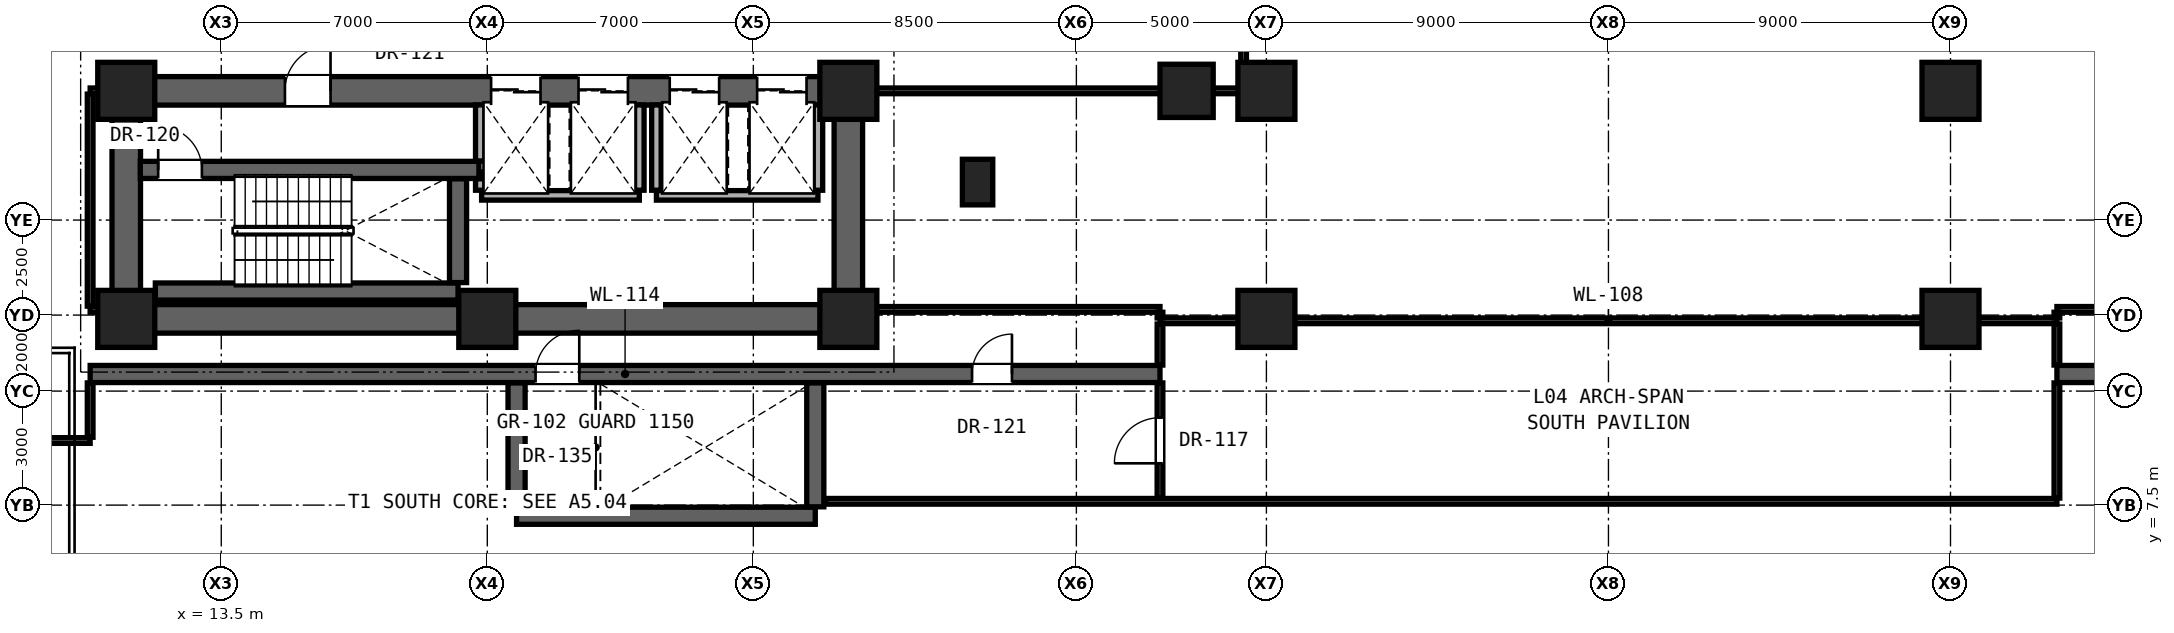
"""IFC4 building model, lengths in metres.
Left out: names, types, materials, properties, quantities, classifications, styles, units other than length and angle.
Written with IfcOpenShell. Run it as: python <this file> out.ifc"""

import sys

from ifc_helpers import new_model, si_unit, direction, frame, frame_2d, origin, origin_2d, place, context, subcontext, project, spatial, rectangle, hollow_rectangle, extrude, element, fill, save


model = new_model("IFC4")
c1 = context("Model", 3, precision=1e-05, world=origin(), true_north=direction((0.0, 1.0)))
c2 = subcontext(c1, "Body", "Model", "MODEL_VIEW")
j1 = project(units=[si_unit("LENGTHUNIT", "METRE"), si_unit("PLANEANGLEUNIT", "RADIAN")], contexts=[c1])
p1 = place(None, origin())
s1 = spatial("IfcSite", under=j1, at=p1, CompositionType="ELEMENT")
p2 = place(p1, origin())
s2 = spatial("IfcBuilding", under=s1, at=p2, CompositionType="ELEMENT")
p3 = place(p2, frame((0.0, 0.0, 18.1)))
s3 = spatial("IfcBuildingStorey", under=s2, at=p3, CompositionType="ELEMENT", Elevation=18.1)
for number, where, z_axis, x_axis in (
    (1, (11.0, 12.4, 0.0), (0.0, 0.0, 1.0), (1.0, 0.0, 0.0)),
    (2, (20.5, 12.4, 0.0), (0.0, 0.0, 1.0), (1.0, 0.0, 0.0)),
    (3, (30.0, 12.4, 0.0), (0.0, 0.0, 1.0), (1.0, 0.0, 0.0)),
    (4, (11.0, 18.4, 0.0), (0.0, 0.0, 1.0), (1.0, 0.0, 0.0)),
    (5, (30.0, 18.4, 0.0), (0.0, 0.0, 1.0), (1.0, 0.0, 0.0)),
):
    element("IfcColumn", number, at=place(p3, frame(where, z_axis=z_axis, x_axis=x_axis)), inside=s3, PredefinedType="COLUMN", context=c2, shape_type="SweptSolid", body=[
        extrude(rectangle(XDim=1.5, YDim=1.5, at=origin_2d()), origin(), (0.0, 0.0, 1.0), 4.3),
    ])
p4 = place(p3, frame((38.9, 18.4, 0.0), z_axis=(0.0, 0.0, 1.0), x_axis=(1.0, 0.0, 0.0)))
e6 = element("IfcColumn", 6, at=p4, inside=s3, PredefinedType="COLUMN", context=c2, shape_type="SweptSolid", body=[
    extrude(hollow_rectangle(XDim=1.4, YDim=1.4, WallThickness=0.08, at=origin_2d()), origin(), (0.0, 0.0, 1.0), 4.3),
])
p5 = place(p3, frame((33.4, 16.0, 0.0), z_axis=(0.0, 0.0, 1.0), x_axis=(1.0, 0.0, 0.0)))
e7 = element("IfcColumn", 7, at=p5, inside=s3, PredefinedType="PILASTER", context=c2, shape_type="SweptSolid", body=[
    extrude(rectangle(XDim=0.8, YDim=1.2, at=origin_2d()), origin(), (0.0, 0.0, 1.0), 4.3),
])
p6 = place(p3, frame((11.0, 12.4, 0.0), z_axis=(0.0, 0.0, 1.0), x_axis=(1.0, 0.0, 0.0)))
e8 = element("IfcWall", 8, at=p6, inside=s3, PredefinedType="SHEAR", context=c2, shape_type="SweptSolid", body=[
    extrude(rectangle(XDim=19.0, YDim=0.75, at=frame_2d((9.5, 0.0))), origin(), (0.0, 0.0, 1.0), 3.65),
])
for number, where, z_axis, x_axis in (
    (9, (11.0, 12.4, 0.0), (0.0, 0.0, 1.0), (0.0, 1.0, 0.0)),
    (10, (30.0, 12.4, 0.0), (0.0, 0.0, 1.0), (0.0, 1.0, 0.0)),
):
    element("IfcWall", number, at=place(p3, frame(where, z_axis=z_axis, x_axis=x_axis)), inside=s3, PredefinedType="SHEAR", context=c2, shape_type="SweptSolid", body=[
        extrude(rectangle(XDim=6.0, YDim=0.75, at=frame_2d((3.0, 0.0))), origin(), (0.0, 0.0, 1.0), 3.65),
    ])
p7 = place(p3, frame((11.0, 18.4, 0.0), z_axis=(0.0, 0.0, 1.0), x_axis=(1.0, 0.0, 0.0)))
e11 = element("IfcWall", 11, at=p7, inside=s3, PredefinedType="SHEAR", context=c2, shape_type="SweptSolid", body=[
    extrude(rectangle(XDim=19.0, YDim=0.75, at=frame_2d((9.5, 0.0))), origin(), (0.0, 0.0, 1.0), 3.65),
])
p8 = place(p7, frame((4.175, 0.0, 0.0)))
e12 = element("IfcOpeningElement", 12, at=p8, cuts=e11, PredefinedType="OPENING", context=c2, shape_type="SweptSolid", body=[
    extrude(rectangle(XDim=1.2, YDim=2.25, at=frame_2d((0.6, 1.125))), frame((0.0, 0.385, 0.0), z_axis=(0.0, -1.0, 0.0), x_axis=(1.0, 0.0, 0.0)), (0.0, 0.0, 1.0), 0.77),
])
p9 = place(p7, frame((9.6, 0.0, 0.0)))
e13 = element("IfcOpeningElement", 13, at=p9, cuts=e11, PredefinedType="OPENING", context=c2, shape_type="SweptSolid", body=[
    extrude(rectangle(XDim=1.3, YDim=2.3, at=frame_2d((0.65, 1.15))), frame((0.0, 0.385, 0.0), z_axis=(0.0, -1.0, 0.0), x_axis=(1.0, 0.0, 0.0)), (0.0, 0.0, 1.0), 0.77),
])
p10 = place(p7, frame((11.9, 0.0, 0.0)))
e14 = element("IfcOpeningElement", 14, at=p10, cuts=e11, PredefinedType="OPENING", context=c2, shape_type="SweptSolid", body=[
    extrude(rectangle(XDim=1.3, YDim=2.3, at=frame_2d((0.65, 1.15))), frame((0.0, 0.385, 0.0), z_axis=(0.0, -1.0, 0.0), x_axis=(1.0, 0.0, 0.0)), (0.0, 0.0, 1.0), 0.77),
])
p11 = place(p7, frame((14.3, 0.0, 0.0)))
e15 = element("IfcOpeningElement", 15, at=p11, cuts=e11, PredefinedType="OPENING", context=c2, shape_type="SweptSolid", body=[
    extrude(rectangle(XDim=1.3, YDim=2.3, at=frame_2d((0.65, 1.15))), frame((0.0, 0.385, 0.0), z_axis=(0.0, -1.0, 0.0), x_axis=(1.0, 0.0, 0.0)), (0.0, 0.0, 1.0), 0.77),
])
p12 = place(p7, frame((16.6, 0.0, 0.0)))
e16 = element("IfcOpeningElement", 16, at=p12, cuts=e11, PredefinedType="OPENING", context=c2, shape_type="SweptSolid", body=[
    extrude(rectangle(XDim=1.3, YDim=2.3, at=frame_2d((0.65, 1.15))), frame((0.0, 0.385, 0.0), z_axis=(0.0, -1.0, 0.0), x_axis=(1.0, 0.0, 0.0)), (0.0, 0.0, 1.0), 0.77),
])
for number, where, z_axis, x_axis in (
    (17, (41.0, 12.4, 0.0), (0.0, 0.0, 1.0), (1.0, 0.0, 0.0)),
    (18, (41.0, 18.4, 0.0), (0.0, 0.0, 1.0), (1.0, 0.0, 0.0)),
    (19, (59.0, 12.4, 0.0), (0.0, 0.0, 1.0), (1.0, 0.0, 0.0)),
    (20, (59.0, 18.4, 0.0), (0.0, 0.0, 1.0), (1.0, 0.0, 0.0)),
):
    element("IfcColumn", number, at=place(p3, frame(where, z_axis=z_axis, x_axis=x_axis)), inside=s3, PredefinedType="COLUMN", context=c2, shape_type="SweptSolid", body=[
        extrude(rectangle(XDim=1.5, YDim=1.5, at=origin_2d()), origin(), (0.0, 0.0, 1.0), 4.3),
    ])
p13 = place(p3, frame((21.27, 7.22, 0.0), z_axis=(0.0, 0.0, 1.0), x_axis=(1.0, 0.0, 0.0)))
e21 = element("IfcWall", 21, at=p13, inside=s3, PredefinedType="SHEAR", context=c2, shape_type="SweptSolid", body=[
    extrude(rectangle(XDim=7.86, YDim=0.45, at=frame_2d((3.93, 0.0))), origin(), (0.0, 0.0, 1.0), 3.65),
])
p14 = place(p3, frame((29.4, 7.6, 0.0), z_axis=(0.0, 0.0, 1.0), x_axis=(1.0, 0.0, 0.0)))
e22 = element("IfcWall", 22, at=p14, inside=s3, PredefinedType="PARTITIONING", context=c2, shape_type="SweptSolid", body=[
    extrude(rectangle(XDim=32.4, YDim=0.15, at=frame_2d((16.2, 0.0))), origin(), (0.0, 0.0, 1.0), 2.869),
])
p15 = place(p3, frame((7.8, 9.2, 0.0), z_axis=(0.0, 0.0, 1.0), x_axis=(1.0, 0.0, 0.0)))
e23 = element("IfcWall", 23, at=p15, inside=s3, PredefinedType="PARTITIONING", context=c2, shape_type="SweptSolid", body=[
    extrude(rectangle(XDim=2.25, YDim=0.15, at=frame_2d((1.125, 0.0))), origin(), (0.0, 0.0, 1.0), 3.65),
])
p16 = place(p3, frame((10.05, 10.95, 0.0), z_axis=(0.0, 0.0, 1.0), x_axis=(1.0, 0.0, 0.0)))
e24 = element("IfcWall", 24, at=p16, inside=s3, PredefinedType="SHEAR", context=c2, shape_type="SweptSolid", body=[
    extrude(rectangle(XDim=28.15, YDim=0.45, at=frame_2d((14.075, 0.0))), origin(), (0.0, 0.0, 1.0), 3.65),
])
p17 = place(p16, frame((11.72, 0.0, 0.0)))
e25 = element("IfcOpeningElement", 25, at=p17, cuts=e24, PredefinedType="OPENING", context=c2, shape_type="SweptSolid", body=[
    extrude(rectangle(XDim=1.15, YDim=2.2, at=frame_2d((0.575, 1.1))), frame((0.0, 0.235, 0.0), z_axis=(0.0, -1.0, 0.0), x_axis=(1.0, 0.0, 0.0)), (0.0, 0.0, 1.0), 0.47),
])
p18 = place(p16, frame((23.205, 0.0, 0.0)))
e26 = element("IfcOpeningElement", 26, at=p18, cuts=e24, PredefinedType="OPENING", context=c2, shape_type="SweptSolid", body=[
    extrude(rectangle(XDim=1.05, YDim=2.2, at=frame_2d((0.525, 1.1))), frame((0.0, 0.235, 0.0), z_axis=(0.0, -1.0, 0.0), x_axis=(1.0, 0.0, 0.0)), (0.0, 0.0, 1.0), 0.47),
])
p19 = place(p3, frame((61.8, 10.95, 0.0), z_axis=(0.0, 0.0, 1.0), x_axis=(1.0, 0.0, 0.0)))
e27 = element("IfcWall", 27, at=p19, inside=s3, PredefinedType="SHEAR", context=c2, shape_type="SweptSolid", body=[
    extrude(rectangle(XDim=29.15, YDim=0.45, at=frame_2d((14.575, 0.0))), origin(), (0.0, 0.0, 1.0), 3.65),
])
p20 = place(p19, frame((7.57, 0.0, 0.0)))
e28 = element("IfcOpeningElement", 28, at=p20, cuts=e27, PredefinedType="OPENING", context=c2, shape_type="SweptSolid", body=[
    extrude(rectangle(XDim=1.15, YDim=2.2, at=frame_2d((0.575, 1.1))), frame((0.0, 0.235, 0.0), z_axis=(0.0, -1.0, 0.0), x_axis=(1.0, 0.0, 0.0)), (0.0, 0.0, 1.0), 0.47),
])
p21 = place(p19, frame((21.63, 0.0, 0.0)))
e29 = element("IfcOpeningElement", 29, at=p21, cuts=e27, PredefinedType="OPENING", context=c2, shape_type="SweptSolid", body=[
    extrude(rectangle(XDim=1.05, YDim=2.2, at=frame_2d((0.525, 1.1))), frame((0.0, 0.235, 0.0), z_axis=(0.0, -1.0, 0.0), x_axis=(1.0, 0.0, 0.0)), (0.0, 0.0, 1.0), 0.47),
])
p22 = place(p3, frame((38.2, 12.35, 0.0), z_axis=(0.0, 0.0, 1.0), x_axis=(1.0, 0.0, 0.0)))
e30 = element("IfcWall", 30, at=p22, inside=s3, PredefinedType="PARTITIONING", context=c2, shape_type="SweptSolid", body=[
    extrude(rectangle(XDim=23.6, YDim=0.15, at=frame_2d((11.8, 0.0))), origin(), (0.0, 0.0, 1.0), 2.602),
])
p23 = place(p3, frame((10.05, 12.65, 0.0), z_axis=(0.0, 0.0, 1.0), x_axis=(1.0, 0.0, 0.0)))
e31 = element("IfcWall", 31, at=p23, inside=s3, PredefinedType="PARTITIONING", context=c2, shape_type="SweptSolid", body=[
    extrude(rectangle(XDim=0.58, YDim=0.15, at=frame_2d((0.29, 0.0))), origin(), (0.0, 0.0, 1.0), 3.65),
])
p24 = place(p3, frame((30.37, 12.65, 0.0), z_axis=(0.0, 0.0, 1.0), x_axis=(1.0, 0.0, 0.0)))
e32 = element("IfcWall", 32, at=p24, inside=s3, PredefinedType="PARTITIONING", context=c2, shape_type="SweptSolid", body=[
    extrude(rectangle(XDim=7.83, YDim=0.15, at=frame_2d((3.915, 0.0))), origin(), (0.0, 0.0, 1.0), 2.694),
])
p25 = place(p3, frame((61.8, 12.65, 0.0), z_axis=(0.0, 0.0, 1.0), x_axis=(1.0, 0.0, 0.0)))
e33 = element("IfcWall", 33, at=p25, inside=s3, PredefinedType="PARTITIONING", context=c2, shape_type="SweptSolid", body=[
    extrude(rectangle(XDim=29.15, YDim=0.15, at=frame_2d((14.575, 0.0))), origin(), (0.0, 0.0, 1.0), 2.786),
])
p26 = place(p3, frame((11.765, 13.12, 0.0), z_axis=(0.0, 0.0, 1.0), x_axis=(1.0, 0.0, 0.0)))
e34 = element("IfcWall", 34, at=p26, inside=s3, PredefinedType="SHEAR", context=c2, shape_type="SweptSolid", body=[
    extrude(rectangle(XDim=7.965, YDim=0.45, at=frame_2d((3.982, 0.0))), origin(), (0.0, 0.0, 1.0), 3.65),
])
p27 = place(p3, frame((20.35, 15.65, 0.0), z_axis=(0.0, 0.0, 1.0), x_axis=(1.0, 0.0, 0.0)))
e35 = element("IfcWall", 35, at=p27, inside=s3, PredefinedType="SOLIDWALL", context=c2, shape_type="SweptSolid", body=[
    extrude(rectangle(XDim=4.15, YDim=0.25, at=frame_2d((2.075, 0.0))), origin(), (0.0, 0.0, 1.0), 3.65),
])
p28 = place(p3, frame((24.95, 15.65, 0.0), z_axis=(0.0, 0.0, 1.0), x_axis=(1.0, 0.0, 0.0)))
e36 = element("IfcWall", 36, at=p28, inside=s3, PredefinedType="SOLIDWALL", context=c2, shape_type="SweptSolid", body=[
    extrude(rectangle(XDim=4.25, YDim=0.25, at=frame_2d((2.125, 0.0))), origin(), (0.0, 0.0, 1.0), 3.65),
])
p29 = place(p3, frame((11.37, 16.32, 0.0), z_axis=(0.0, 0.0, 1.0), x_axis=(1.0, 0.0, 0.0)))
e37 = element("IfcWall", 37, at=p29, inside=s3, PredefinedType="SHEAR", context=c2, shape_type="SweptSolid", body=[
    extrude(rectangle(XDim=8.91, YDim=0.45, at=frame_2d((4.455, 0.0))), origin(), (0.0, 0.0, 1.0), 3.65),
])
p30 = place(p29, frame((0.47, 0.0, 0.0)))
e38 = element("IfcOpeningElement", 38, at=p30, cuts=e37, PredefinedType="OPENING", context=c2, shape_type="SweptSolid", body=[
    extrude(rectangle(XDim=1.15, YDim=2.2, at=frame_2d((0.575, 1.1))), frame((0.0, 0.235, 0.0), z_axis=(0.0, -1.0, 0.0), x_axis=(1.0, 0.0, 0.0)), (0.0, 0.0, 1.0), 0.47),
])
p31 = place(p3, frame((10.05, 18.4, 0.0), z_axis=(0.0, 0.0, 1.0), x_axis=(1.0, 0.0, 0.0)))
e39 = element("IfcWall", 39, at=p31, inside=s3, PredefinedType="PARTITIONING", context=c2, shape_type="SweptSolid", body=[
    extrude(rectangle(XDim=0.58, YDim=0.15, at=frame_2d((0.29, 0.0))), origin(), (0.0, 0.0, 1.0), 2.542),
])
p32 = place(p3, frame((30.37, 18.4, 0.0), z_axis=(0.0, 0.0, 1.0), x_axis=(1.0, 0.0, 0.0)))
e40 = element("IfcWall", 40, at=p32, inside=s3, PredefinedType="PARTITIONING", context=c2, shape_type="SweptSolid", body=[
    extrude(rectangle(XDim=10.03, YDim=0.15, at=frame_2d((5.015, 0.0))), origin(), (0.0, 0.0, 1.0), 2.542),
])
p33 = place(p3, frame((10.05, 9.285, 0.0), z_axis=(0.0, 0.0, 1.0), x_axis=(0.0, 1.0, 0.0)))
e41 = element("IfcWall", 41, at=p33, inside=s3, PredefinedType="PARTITIONING", context=c2, shape_type="SweptSolid", body=[
    extrude(rectangle(XDim=1.43, YDim=0.15, at=frame_2d((0.715, 0.0))), origin(), (0.0, 0.0, 1.0), 3.65),
])
p34 = place(p3, frame((10.05, 12.735, 0.0), z_axis=(0.0, 0.0, 1.0), x_axis=(0.0, 1.0, 0.0)))
e42 = element("IfcWall", 42, at=p34, inside=s3, PredefinedType="PARTITIONING", context=c2, shape_type="SweptSolid", body=[
    extrude(rectangle(XDim=5.58, YDim=0.15, at=frame_2d((2.79, 0.0))), origin(), (0.0, 0.0, 1.0), 2.542),
])
p35 = place(p3, frame((19.73, 13.355, 0.0), z_axis=(0.0, 0.0, 1.0), x_axis=(0.0, 1.0, 0.0)))
e43 = element("IfcWall", 43, at=p35, inside=s3, PredefinedType="SHEAR", context=c2, shape_type="SweptSolid", body=[
    extrude(rectangle(XDim=2.73, YDim=0.45, at=frame_2d((1.365, 0.0))), origin(), (0.0, 0.0, 1.0), 3.65),
])
p36 = place(p3, frame((20.315, 15.785, 0.0), z_axis=(0.0, 0.0, 1.0), x_axis=(0.0, 1.0, 0.0)))
e44 = element("IfcWall", 44, at=p36, inside=s3, PredefinedType="SOLIDWALL", context=c2, shape_type="SweptSolid", body=[
    extrude(rectangle(XDim=0.3, YDim=0.25, at=frame_2d((0.15, 0.0))), origin(), (0.0, 0.0, 1.0), 3.65),
])
p37 = place(p3, frame((20.315, 16.555, 0.0), z_axis=(0.0, 0.0, 1.0), x_axis=(0.0, 1.0, 0.0)))
e45 = element("IfcWall", 45, at=p37, inside=s3, PredefinedType="SOLIDWALL", context=c2, shape_type="SweptSolid", body=[
    extrude(rectangle(XDim=1.475, YDim=0.25, at=frame_2d((0.738, 0.0))), origin(), (0.0, 0.0, 1.0), 3.65),
])
p38 = place(p3, frame((21.27, 7.455, 0.0), z_axis=(0.0, 0.0, 1.0), x_axis=(0.0, 1.0, 0.0)))
e46 = element("IfcWall", 46, at=p38, inside=s3, PredefinedType="SHEAR", context=c2, shape_type="SweptSolid", body=[
    extrude(rectangle(XDim=3.26, YDim=0.45, at=frame_2d((1.63, 0.0))), origin(), (0.0, 0.0, 1.0), 3.65),
])
for number, where, z_axis, x_axis in (
    (47, (24.5, 15.785, 0.0), (0.0, 0.0, 1.0), (0.0, 1.0, 0.0)),
    (48, (24.95, 15.785, 0.0), (0.0, 0.0, 1.0), (0.0, 1.0, 0.0)),
):
    element("IfcWall", number, at=place(p3, frame(where, z_axis=z_axis, x_axis=x_axis)), inside=s3, PredefinedType="SOLIDWALL", context=c2, shape_type="SweptSolid", body=[
        extrude(rectangle(XDim=2.245, YDim=0.25, at=frame_2d((1.123, 0.0))), origin(), (0.0, 0.0, 1.0), 3.65),
    ])
p39 = place(p3, frame((29.13, 7.455, 0.0), z_axis=(0.0, 0.0, 1.0), x_axis=(0.0, 1.0, 0.0)))
e49 = element("IfcWall", 49, at=p39, inside=s3, PredefinedType="SHEAR", context=c2, shape_type="SweptSolid", body=[
    extrude(rectangle(XDim=3.26, YDim=0.45, at=frame_2d((1.63, 0.0))), origin(), (0.0, 0.0, 1.0), 3.65),
])
p40 = place(p3, frame((29.2, 15.785, 0.0), z_axis=(0.0, 0.0, 1.0), x_axis=(0.0, 1.0, 0.0)))
e50 = element("IfcWall", 50, at=p40, inside=s3, PredefinedType="SOLIDWALL", context=c2, shape_type="SweptSolid", body=[
    extrude(rectangle(XDim=2.245, YDim=0.25, at=frame_2d((1.123, 0.0))), origin(), (0.0, 0.0, 1.0), 3.65),
])
p41 = place(p3, frame((38.2, 7.685, 0.0), z_axis=(0.0, 0.0, 1.0), x_axis=(0.0, 1.0, 0.0)))
e51 = element("IfcWall", 51, at=p41, inside=s3, PredefinedType="PARTITIONING", context=c2, shape_type="SweptSolid", body=[
    extrude(rectangle(XDim=3.03, YDim=0.15, at=frame_2d((1.515, 0.0))), origin(), (0.0, 0.0, 1.0), 3.65),
])
p42 = place(p41, frame((0.915, 0.0, 0.0)))
e52 = element("IfcOpeningElement", 52, at=p42, cuts=e51, PredefinedType="OPENING", context=c2, shape_type="SweptSolid", body=[
    extrude(rectangle(XDim=1.2, YDim=2.25, at=frame_2d((0.6, 1.125))), frame((0.0, 0.085, 0.0), z_axis=(0.0, -1.0, 0.0), x_axis=(1.0, 0.0, 0.0)), (0.0, 0.0, 1.0), 0.17),
])
p43 = place(p3, frame((38.2, 11.185, 0.0), z_axis=(0.0, 0.0, 1.0), x_axis=(0.0, 1.0, 0.0)))
e53 = element("IfcWall", 53, at=p43, inside=s3, PredefinedType="PARTITIONING", context=c2, shape_type="SweptSolid", body=[
    extrude(rectangle(XDim=1.08, YDim=0.15, at=frame_2d((0.54, 0.0))), origin(), (0.0, 0.0, 1.0), 2.694),
])
p44 = place(p3, frame((38.2, 12.425, 0.0), z_axis=(0.0, 0.0, 1.0), x_axis=(0.0, 1.0, 0.0)))
e54 = element("IfcWall", 54, at=p44, inside=s3, PredefinedType="PARTITIONING", context=c2, shape_type="SweptSolid", body=[
    extrude(rectangle(XDim=0.15, YDim=0.15, at=frame_2d((0.075, 0.0))), origin(), (0.0, 0.0, 1.0), 2.694),
])
p45 = place(p3, frame((40.4, 18.485, 0.0), z_axis=(0.0, 0.0, 1.0), x_axis=(0.0, 1.0, 0.0)))
e55 = element("IfcWall", 55, at=p45, inside=s3, PredefinedType="PARTITIONING", context=c2, shape_type="SweptSolid", body=[
    extrude(rectangle(XDim=2.23, YDim=0.15, at=frame_2d((1.115, 0.0))), origin(), (0.0, 0.0, 1.0), 2.694),
])
p46 = place(p3, frame((61.8, 7.685, 0.0), z_axis=(0.0, 0.0, 1.0), x_axis=(0.0, 1.0, 0.0)))
e56 = element("IfcWall", 56, at=p46, inside=s3, PredefinedType="PARTITIONING", context=c2, shape_type="SweptSolid", body=[
    extrude(rectangle(XDim=3.03, YDim=0.15, at=frame_2d((1.515, 0.0))), origin(), (0.0, 0.0, 1.0), 3.65),
])
p47 = place(p3, frame((61.8, 11.185, 0.0), z_axis=(0.0, 0.0, 1.0), x_axis=(0.0, 1.0, 0.0)))
e57 = element("IfcWall", 57, at=p47, inside=s3, PredefinedType="PARTITIONING", context=c2, shape_type="SweptSolid", body=[
    extrude(rectangle(XDim=1.08, YDim=0.15, at=frame_2d((0.54, 0.0))), origin(), (0.0, 0.0, 1.0), 3.65),
])
p48 = place(p3, frame((61.8, 12.425, 0.0), z_axis=(0.0, 0.0, 1.0), x_axis=(0.0, 1.0, 0.0)))
e58 = element("IfcWall", 58, at=p48, inside=s3, PredefinedType="PARTITIONING", context=c2, shape_type="SweptSolid", body=[
    extrude(rectangle(XDim=0.15, YDim=0.15, at=frame_2d((0.075, 0.0))), origin(), (0.0, 0.0, 1.0), 3.65),
])
p49 = place(p8, origin())
e59 = element("IfcDoor", 59, at=p49, inside=s3, OperationType="SINGLE_SWING_RIGHT", PredefinedType="DOOR", context=c2, shape_type="SweptSolid", body=[
    extrude(rectangle(XDim=1.2, YDim=2.25, at=frame_2d((0.6, 1.125))), frame((0.0, 0.025, 0.0), z_axis=(0.0, -1.0, 0.0), x_axis=(1.0, 0.0, 0.0)), (0.0, 0.0, 1.0), 0.05),
])
fill(e12, e59)
p50 = place(p30, origin())
e60 = element("IfcDoor", 60, at=p50, inside=s3, OperationType="SINGLE_SWING_LEFT", PredefinedType="DOOR", context=c2, shape_type="SweptSolid", body=[
    extrude(rectangle(XDim=1.15, YDim=2.2, at=frame_2d((0.575, 1.1))), frame((0.0, 0.025, 0.0), z_axis=(0.0, -1.0, 0.0), x_axis=(1.0, 0.0, 0.0)), (0.0, 0.0, 1.0), 0.05),
])
fill(e38, e60)
p51 = place(p17, origin())
e61 = element("IfcDoor", 61, at=p51, inside=s3, OperationType="SINGLE_SWING_RIGHT", PredefinedType="DOOR", context=c2, shape_type="SweptSolid", body=[
    extrude(rectangle(XDim=1.15, YDim=2.2, at=frame_2d((0.575, 1.1))), frame((0.0, 0.025, 0.0), z_axis=(0.0, -1.0, 0.0), x_axis=(1.0, 0.0, 0.0)), (0.0, 0.0, 1.0), 0.05),
])
fill(e25, e61)
p52 = place(p42, origin())
e62 = element("IfcDoor", 62, at=p52, inside=s3, OperationType="SINGLE_SWING_LEFT", PredefinedType="DOOR", context=c2, shape_type="SweptSolid", body=[
    extrude(rectangle(XDim=1.2, YDim=2.25, at=frame_2d((0.6, 1.125))), frame((0.0, 0.025, 0.0), z_axis=(0.0, -1.0, 0.0), x_axis=(1.0, 0.0, 0.0)), (0.0, 0.0, 1.0), 0.05),
])
fill(e52, e62)
p53 = place(p18, origin())
e63 = element("IfcDoor", 63, at=p53, inside=s3, OperationType="SINGLE_SWING_RIGHT", PredefinedType="DOOR", context=c2, shape_type="SweptSolid", body=[
    extrude(rectangle(XDim=1.05, YDim=2.2, at=frame_2d((0.525, 1.1))), frame((0.0, 0.025, 0.0), z_axis=(0.0, -1.0, 0.0), x_axis=(1.0, 0.0, 0.0)), (0.0, 0.0, 1.0), 0.05),
])
fill(e26, e63)
p54 = place(p9, origin())
e64 = element("IfcDoor", 64, at=p54, inside=s3, OperationType="DOUBLE_DOOR_SLIDING", PredefinedType="DOOR", context=c2, shape_type="SweptSolid", body=[
    extrude(rectangle(XDim=1.3, YDim=2.3, at=frame_2d((0.65, 1.15))), frame((0.0, 0.025, 0.0), z_axis=(0.0, -1.0, 0.0), x_axis=(1.0, 0.0, 0.0)), (0.0, 0.0, 1.0), 0.05),
])
fill(e13, e64)
p55 = place(p10, origin())
e65 = element("IfcDoor", 65, at=p55, inside=s3, OperationType="DOUBLE_DOOR_SLIDING", PredefinedType="DOOR", context=c2, shape_type="SweptSolid", body=[
    extrude(rectangle(XDim=1.3, YDim=2.3, at=frame_2d((0.65, 1.15))), frame((0.0, 0.025, 0.0), z_axis=(0.0, -1.0, 0.0), x_axis=(1.0, 0.0, 0.0)), (0.0, 0.0, 1.0), 0.05),
])
fill(e14, e65)
p56 = place(p11, origin())
e66 = element("IfcDoor", 66, at=p56, inside=s3, OperationType="DOUBLE_DOOR_SLIDING", PredefinedType="DOOR", context=c2, shape_type="SweptSolid", body=[
    extrude(rectangle(XDim=1.3, YDim=2.3, at=frame_2d((0.65, 1.15))), frame((0.0, 0.025, 0.0), z_axis=(0.0, -1.0, 0.0), x_axis=(1.0, 0.0, 0.0)), (0.0, 0.0, 1.0), 0.05),
])
fill(e15, e66)
p57 = place(p12, origin())
e67 = element("IfcDoor", 67, at=p57, inside=s3, OperationType="DOUBLE_DOOR_SLIDING", PredefinedType="DOOR", context=c2, shape_type="SweptSolid", body=[
    extrude(rectangle(XDim=1.3, YDim=2.3, at=frame_2d((0.65, 1.15))), frame((0.0, 0.025, 0.0), z_axis=(0.0, -1.0, 0.0), x_axis=(1.0, 0.0, 0.0)), (0.0, 0.0, 1.0), 0.05),
])
fill(e16, e67)
save(model, sys.argv[1])
